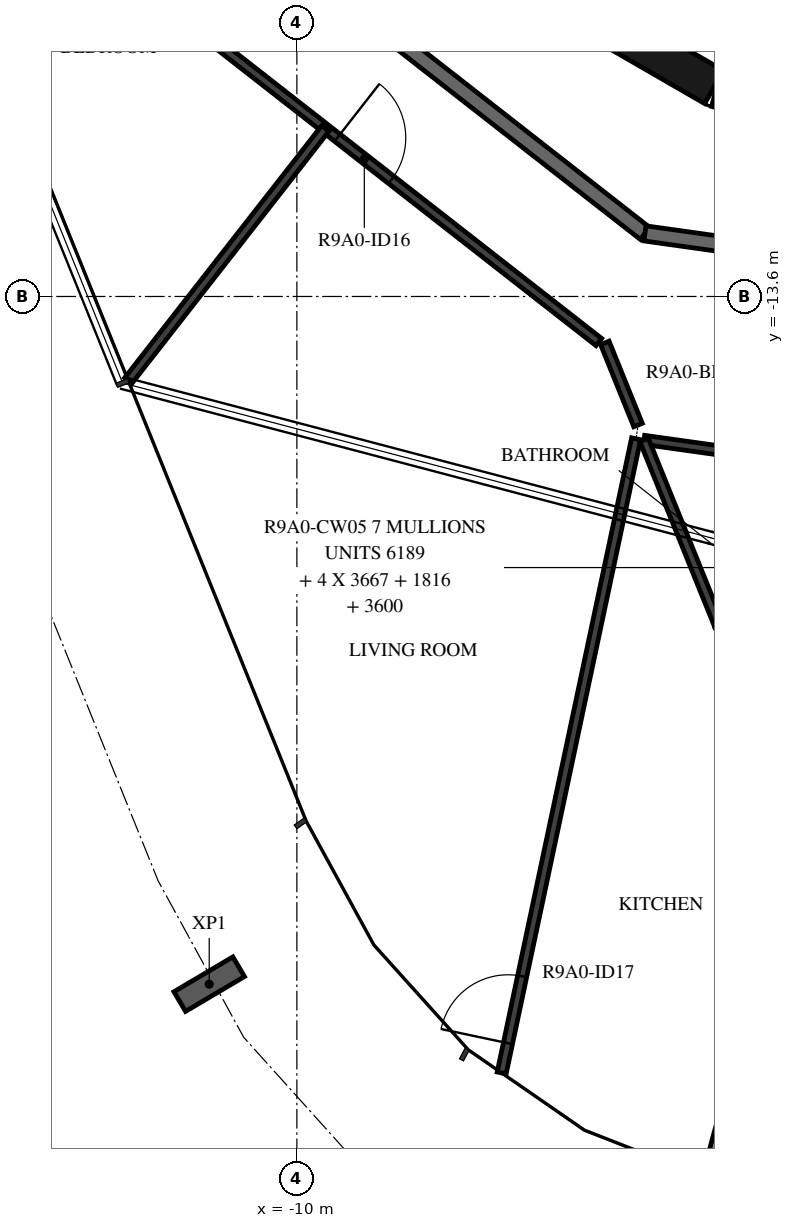
"""IFC4 building model, lengths in metres.
Left out: names, types, materials, properties, quantities, classifications, styles, units other than length and angle.
Written with IfcOpenShell. Run it as: python <this file> out.ifc"""

import sys

from ifc_helpers import new_model, si_unit, direction, frame, frame_2d, origin, origin_2d, place, context, subcontext, project, spatial, rectangle, i_section, extrude, element, fill, save


model = new_model("IFC4")
c1 = context("Model", 3, precision=1e-05, world=origin(), true_north=direction((0.0, 1.0)))
c2 = subcontext(c1, "Body", "Model", "MODEL_VIEW")
j1 = project(units=[si_unit("LENGTHUNIT", "METRE"), si_unit("PLANEANGLEUNIT", "RADIAN")], contexts=[c1])
p1 = place(None, origin())
s1 = spatial("IfcSite", under=j1, at=p1, CompositionType="ELEMENT")
p2 = place(p1, origin())
s2 = spatial("IfcBuilding", under=s1, at=p2, CompositionType="ELEMENT")
p3 = place(p2, frame((0.0, 0.0, 340.0)))
s3 = spatial("IfcBuildingStorey", under=s2, at=p3, CompositionType="ELEMENT", Elevation=340.0)
p4 = place(p3, frame((-11.153, -22.647, -0.38), z_axis=(0.0, 0.0, 1.0), x_axis=(-0.509114042361, 0.86069907161, 0.0)))
e1 = element("IfcColumn", 1, at=p4, inside=s3, PredefinedType="COLUMN", context=c2, shape_type="SweptSolid", body=[
    extrude(i_section(OverallWidth=0.3, OverallDepth=0.9, WebThickness=0.019, FlangeThickness=0.035, FilletRadius=0.03, at=origin_2d()), origin(), (0.0, 0.0, 1.0), 3.5),
])
for number, where, z_axis, x_axis in (
    (2, (-7.137, -9.329, 0.0), (0.0, 0.0, 1.0), (0.866, -0.5, 0.0)),
    (3, (-4.479, -10.858, 0.0), (0.0, 0.0, 1.0), (0.966, -0.259, 0.0)),
):
    element("IfcWall", number, at=place(p3, frame(where, z_axis=z_axis, x_axis=x_axis)), inside=s3, PredefinedType="SHEAR", context=c2, shape_type="SweptSolid", body=[
        extrude(rectangle(XDim=3.033, YDim=0.5, at=frame_2d((1.516, 0.0))), origin(), (0.0, 0.0, 1.0), 3.12),
    ])
p5 = place(p3, frame((-11.079, -8.349, 0.0), z_axis=(0.0, 0.0, 1.0), x_axis=(0.78800478687, -0.615669112324, 0.0)))
e4 = element("IfcWall", 4, at=p5, inside=s3, PredefinedType="STANDARD", context=c2, shape_type="SweptSolid", body=[
    extrude(rectangle(XDim=7.181, YDim=0.2, at=frame_2d((3.591, 0.0))), origin(), (0.0, 0.0, 1.0), 3.12),
])
p6 = place(p3, frame((-5.42, -12.77, 0.0), z_axis=(0.0, 0.0, 1.0), x_axis=(0.990270565508, -0.139155334385, 0.0)))
e5 = element("IfcWall", 5, at=p6, inside=s3, PredefinedType="STANDARD", context=c2, shape_type="SweptSolid", body=[
    extrude(rectangle(XDim=7.181, YDim=0.2, at=frame_2d((3.59, 0.0))), origin(), (0.0, 0.0, 1.0), 3.12),
])
p7 = place(p6, frame((2.39, 0.0, 0.0)))
e6 = element("IfcOpeningElement", 6, at=p7, cuts=e5, PredefinedType="OPENING", context=c2, shape_type="SweptSolid", body=[
    extrude(rectangle(XDim=1.0, YDim=2.1, at=frame_2d((0.5, 1.05))), frame((0.0, 0.11, 0.0), z_axis=(0.0, -1.0, 0.0), x_axis=(1.0, 0.0, 0.0)), (0.0, 0.0, 1.0), 0.22),
])
p8 = place(p6, frame((4.091, 0.0, 0.0)))
e7 = element("IfcOpeningElement", 7, at=p8, cuts=e5, PredefinedType="OPENING", context=c2, shape_type="SweptSolid", body=[
    extrude(rectangle(XDim=1.0, YDim=2.1, at=frame_2d((0.5, 1.05))), frame((0.0, 0.11, 0.0), z_axis=(0.0, -1.0, 0.0), x_axis=(1.0, 0.0, 0.0)), (0.0, 0.0, 1.0), 0.22),
])
p9 = place(p3, frame((-4.574, -25.21, 0.0), z_axis=(0.0, 0.0, 1.0), x_axis=(0.264579024648, 0.964364007892, 0.0)))
e8 = element("IfcWall", 8, at=p9, inside=s3, PredefinedType="STANDARD", context=c2, shape_type="SweptSolid", body=[
    extrude(rectangle(XDim=6.486, YDim=0.2, at=frame_2d((3.243, 0.0))), origin(), (0.0, 0.0, 1.0), 2.73),
])
p10 = place(p3, frame((-12.319, -9.283, 0.0), z_axis=(0.0, 0.0, 1.0), x_axis=(0.788000268464, -0.61567489546, 0.0)))
e9 = element("IfcWall", 9, at=p10, inside=s3, PredefinedType="PARTITIONING", context=c2, shape_type="SweptSolid", body=[
    extrude(rectangle(XDim=7.985, YDim=0.12, at=frame_2d((3.992, 0.0))), origin(), (0.0, 0.0, 1.0), 3.12),
])
p11 = place(p10, frame((3.619, 0.0, 0.0)))
e10 = element("IfcOpeningElement", 10, at=p11, cuts=e9, PredefinedType="OPENING", context=c2, shape_type="SweptSolid", body=[
    extrude(rectangle(XDim=0.9, YDim=2.1, at=frame_2d((0.45, 1.05))), frame((0.0, 0.07, 0.0), z_axis=(0.0, -1.0, 0.0), x_axis=(1.0, 0.0, 0.0)), (0.0, 0.0, 1.0), 0.14),
])
p12 = place(p3, frame((-5.948, -14.21, 0.0), z_axis=(0.0, 0.0, 1.0), x_axis=(0.374601530156, -0.927185900241, 0.0)))
e11 = element("IfcWall", 11, at=p12, inside=s3, PredefinedType="PARTITIONING", context=c2, shape_type="SweptSolid", body=[
    extrude(rectangle(XDim=1.166, YDim=0.12, at=frame_2d((0.583, 0.0))), origin(), (0.0, 0.0, 1.0), 3.12),
])
p13 = place(p3, frame((-5.433, -15.487, 0.0), z_axis=(0.0, 0.0, 1.0), x_axis=(0.990268451053, -0.139170380644, 0.0)))
e12 = element("IfcWall", 12, at=p13, inside=s3, PredefinedType="PARTITIONING", context=c2, shape_type="SweptSolid", body=[
    extrude(rectangle(XDim=1.595, YDim=0.12, at=frame_2d((0.797, 0.0))), origin(), (0.0, 0.0, 1.0), 3.12),
])
p14 = place(p3, frame((-12.219, -14.708, 0.0), z_axis=(0.0, 0.0, 1.0), x_axis=(0.615656413137, 0.788014708596, 0.0)))
e13 = element("IfcWall", 13, at=p14, inside=s3, PredefinedType="PARTITIONING", context=c2, shape_type="SweptSolid", body=[
    extrude(rectangle(XDim=4.213, YDim=0.12, at=frame_2d((2.106, 0.0))), origin(), (0.0, 0.0, 1.0), 3.12),
])
p15 = place(p3, frame((-7.305, -23.815, 0.0), z_axis=(0.0, 0.0, 1.0), x_axis=(0.207366409306, 0.978263345062, 0.0)))
e14 = element("IfcWall", 14, at=p15, inside=s3, PredefinedType="PARTITIONING", context=c2, shape_type="SweptSolid", body=[
    extrude(rectangle(XDim=8.529, YDim=0.12, at=frame_2d((4.264, 0.0))), origin(), (0.0, 0.0, 1.0), 3.12),
])
p16 = place(p15, frame((0.4, 0.0, 0.0)))
e15 = element("IfcOpeningElement", 15, at=p16, cuts=e14, PredefinedType="OPENING", context=c2, shape_type="SweptSolid", body=[
    extrude(rectangle(XDim=0.9, YDim=2.1, at=frame_2d((0.45, 1.05))), frame((0.0, 0.07, 0.0), z_axis=(0.0, -1.0, 0.0), x_axis=(1.0, 0.0, 0.0)), (0.0, 0.0, 1.0), 0.14),
])
p17 = place(p3, frame((-4.445, -17.93, 0.0), z_axis=(0.0, 0.0, 1.0), x_axis=(-0.374614676827, 0.927180588616, 0.0)))
e16 = element("IfcWall", 16, at=p17, inside=s3, PredefinedType="PARTITIONING", context=c2, shape_type="SweptSolid", body=[
    extrude(rectangle(XDim=2.635, YDim=0.12, at=frame_2d((1.318, 0.0))), origin(), (0.0, 0.0, 1.0), 3.12),
])
p18 = place(p11, origin())
e17 = element("IfcDoor", 17, at=p18, inside=s3, OperationType="SINGLE_SWING_RIGHT", PredefinedType="DOOR", context=c2, shape_type="SweptSolid", body=[
    extrude(rectangle(XDim=0.9, YDim=2.1, at=frame_2d((0.45, 1.05))), frame((0.0, 0.025, 0.0), z_axis=(0.0, -1.0, 0.0), x_axis=(1.0, 0.0, 0.0)), (0.0, 0.0, 1.0), 0.05),
])
fill(e10, e17)
p19 = place(p16, origin())
e18 = element("IfcDoor", 18, at=p19, inside=s3, OperationType="SINGLE_SWING_RIGHT", PredefinedType="DOOR", context=c2, shape_type="SweptSolid", body=[
    extrude(rectangle(XDim=0.9, YDim=2.1, at=frame_2d((0.45, 1.05))), frame((0.0, 0.025, 0.0), z_axis=(0.0, -1.0, 0.0), x_axis=(1.0, 0.0, 0.0)), (0.0, 0.0, 1.0), 0.05),
])
fill(e15, e18)
save(model, sys.argv[1])
